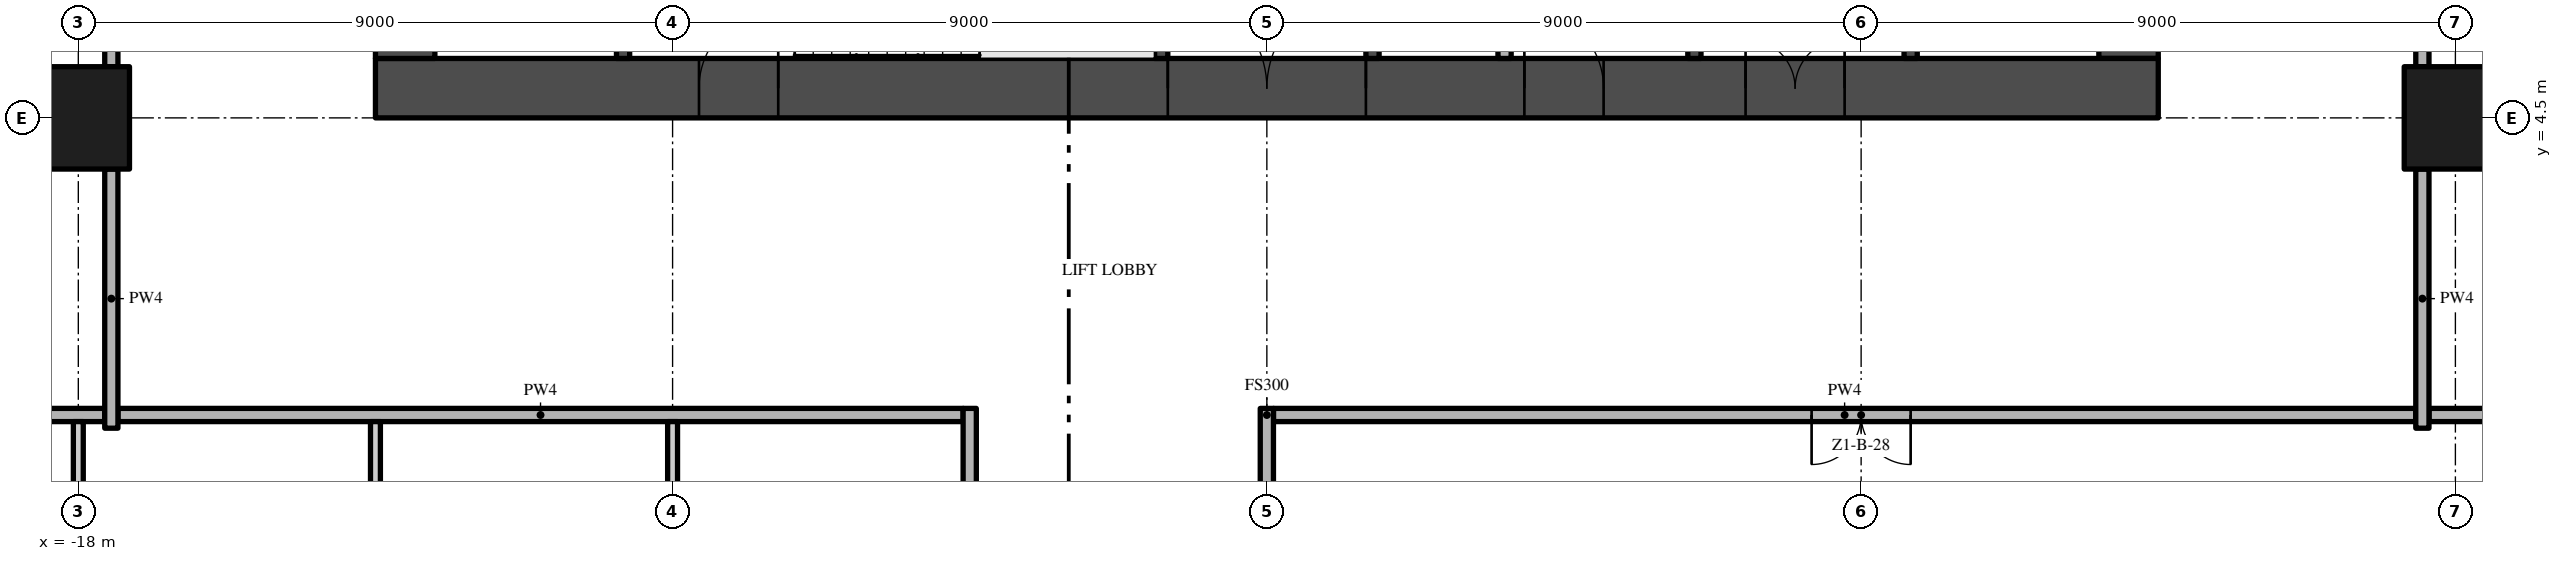
"""IFC4 building model, lengths in metres.
Left out: names, types, materials, properties, quantities, classifications, styles, units other than length and angle.
Written with IfcOpenShell. Run it as: python <this file> out.ifc"""

import sys

from ifc_helpers import new_model, si_unit, direction, frame, frame_2d, origin, origin_2d, place, context, subcontext, project, spatial, rectangle, extrude, element, fill, save


model = new_model("IFC4")
c1 = context("Model", 3, precision=1e-05, world=origin(), true_north=direction((0.0, 1.0)))
c2 = subcontext(c1, "Body", "Model", "MODEL_VIEW")
j1 = project(units=[si_unit("LENGTHUNIT", "METRE"), si_unit("PLANEANGLEUNIT", "RADIAN")], contexts=[c1])
p1 = place(None, origin())
s1 = spatial("IfcSite", under=j1, at=p1, CompositionType="ELEMENT")
p2 = place(p1, origin())
s2 = spatial("IfcBuilding", under=s1, at=p2, CompositionType="ELEMENT")
p3 = place(p2, frame((0.0, 0.0, 30.2)))
s3 = spatial("IfcBuildingStorey", under=s2, at=p3, CompositionType="ELEMENT", Elevation=30.2)
p4 = place(p3, frame((-13.5, 4.95, -0.3), z_axis=(0.0, 0.0, 1.0), x_axis=(1.0, 0.0, 0.0)))
e1 = element("IfcWall", 1, at=p4, inside=s3, PredefinedType="SHEAR", context=c2, shape_type="SweptSolid", body=[
    extrude(rectangle(XDim=27.0, YDim=0.9, at=frame_2d((13.5, 0.0))), origin(), (0.0, 0.0, 1.0), 3.8),
])
p5 = place(p4, frame((12.0, 0.0, 0.3)))
e2 = element("IfcOpeningElement", 2, at=p5, cuts=e1, PredefinedType="OPENING", context=c2, shape_type="SweptSolid", body=[
    extrude(rectangle(XDim=3.0, YDim=2.4, at=frame_2d((1.5, 1.2))), frame((0.0, 0.46, 0.0), z_axis=(0.0, -1.0, 0.0), x_axis=(1.0, 0.0, 0.0)), (0.0, 0.0, 1.0), 0.92),
])
p6 = place(p4, frame((4.9, 0.0, 0.3)))
e3 = element("IfcOpeningElement", 3, at=p6, cuts=e1, PredefinedType="OPENING", context=c2, shape_type="SweptSolid", body=[
    extrude(rectangle(XDim=1.2, YDim=2.2, at=frame_2d((0.6, 1.1))), frame((0.0, 0.46, 0.0), z_axis=(0.0, -1.0, 0.0), x_axis=(1.0, 0.0, 0.0)), (0.0, 0.0, 1.0), 0.92),
])
p7 = place(p4, frame((20.75, 0.0, 0.3)))
e4 = element("IfcOpeningElement", 4, at=p7, cuts=e1, PredefinedType="OPENING", context=c2, shape_type="SweptSolid", body=[
    extrude(rectangle(XDim=1.5, YDim=2.2, at=frame_2d((0.75, 1.1))), frame((0.0, 0.46, 0.0), z_axis=(0.0, -1.0, 0.0), x_axis=(1.0, 0.0, 0.0)), (0.0, 0.0, 1.0), 0.92),
])
p8 = place(p4, frame((17.4, 0.0, 0.3)))
e5 = element("IfcOpeningElement", 5, at=p8, cuts=e1, PredefinedType="OPENING", context=c2, shape_type="SweptSolid", body=[
    extrude(rectangle(XDim=1.2, YDim=2.2, at=frame_2d((0.6, 1.1))), frame((0.0, 0.46, 0.0), z_axis=(0.0, -1.0, 0.0), x_axis=(1.0, 0.0, 0.0)), (0.0, 0.0, 1.0), 0.92),
])
p9 = place(p3, frame((13.05, 5.4, -0.3), z_axis=(0.0, 0.0, 1.0), x_axis=(0.0, 1.0, 0.0)))
e6 = element("IfcWall", 6, at=p9, inside=s3, PredefinedType="SHEAR", context=c2, shape_type="SweptSolid", body=[
    extrude(rectangle(XDim=16.2, YDim=0.9, at=frame_2d((8.1, 0.0))), origin(), (0.0, 0.0, 1.0), 3.8),
])
p10 = place(p9, frame((6.0, 0.0, 0.3)))
e7 = element("IfcOpeningElement", 7, at=p10, cuts=e6, PredefinedType="OPENING", context=c2, shape_type="SweptSolid", body=[
    extrude(rectangle(XDim=1.2, YDim=2.2, at=frame_2d((0.6, 1.1))), frame((0.0, 0.46, 0.0), z_axis=(0.0, -1.0, 0.0), x_axis=(1.0, 0.0, 0.0)), (0.0, 0.0, 1.0), 0.92),
])
p11 = place(p3, frame((-13.05, 21.6, -0.3), z_axis=(0.0, 0.0, 1.0), x_axis=(0.0, -1.0, 0.0)))
e8 = element("IfcWall", 8, at=p11, inside=s3, PredefinedType="SHEAR", context=c2, shape_type="SweptSolid", body=[
    extrude(rectangle(XDim=16.2, YDim=0.9, at=frame_2d((8.1, 0.0))), origin(), (0.0, 0.0, 1.0), 3.8),
])
p12 = place(p11, frame((9.0, 0.0, 0.3)))
e9 = element("IfcOpeningElement", 9, at=p12, cuts=e8, PredefinedType="OPENING", context=c2, shape_type="SweptSolid", body=[
    extrude(rectangle(XDim=1.2, YDim=2.2, at=frame_2d((0.6, 1.1))), frame((0.0, 0.46, 0.0), z_axis=(0.0, -1.0, 0.0), x_axis=(1.0, 0.0, 0.0)), (0.0, 0.0, 1.0), 0.92),
])
for number, where, z_axis, x_axis in (
    (10, (-18.0, 4.5, 0.0), (0.0, 0.0, 1.0), (1.0, 0.0, 0.0)),
    (11, (18.0, 4.5, 0.0), (0.0, 0.0, 1.0), (1.0, 0.0, 0.0)),
):
    element("IfcColumn", number, at=place(p3, frame(where, z_axis=z_axis, x_axis=x_axis)), inside=s3, PredefinedType="COLUMN", context=c2, shape_type="SweptSolid", body=[
        extrude(rectangle(XDim=1.55, YDim=1.55, at=origin_2d()), origin(), (0.0, 0.0, 1.0), 3.5),
    ])
for number, where, z_axis, x_axis in (
    (12, (-9.75, 5.4, 0.0), (0.0, 0.0, 1.0), (0.0, 1.0, 0.0)),
    (13, (-1.6, 5.4, 0.0), (0.0, 0.0, 1.0), (0.0, 1.0, 0.0)),
):
    element("IfcWall", number, at=place(p3, frame(where, z_axis=z_axis, x_axis=x_axis)), inside=s3, PredefinedType="SHEAR", context=c2, shape_type="SweptSolid", body=[
        extrude(rectangle(XDim=2.55, YDim=0.2, at=frame_2d((1.275, 0.0))), origin(), (0.0, 0.0, 1.0), 3.5),
    ])
p13 = place(p3, frame((1.6, 13.5, 0.0), z_axis=(0.0, 0.0, 1.0), x_axis=(0.0, -1.0, 0.0)))
e14 = element("IfcWall", 14, at=p13, inside=s3, PredefinedType="SHEAR", context=c2, shape_type="SweptSolid", body=[
    extrude(rectangle(XDim=8.1, YDim=0.2, at=frame_2d((4.05, 0.0))), origin(), (0.0, 0.0, 1.0), 3.5),
])
p14 = place(p13, frame((3.2, 0.0, 0.0)))
e15 = element("IfcOpeningElement", 15, at=p14, cuts=e14, PredefinedType="OPENING", context=c2, shape_type="SweptSolid", body=[
    extrude(rectangle(XDim=0.9, YDim=2.1, at=frame_2d((0.45, 1.05))), frame((0.0, 0.11, 0.0), z_axis=(0.0, -1.0, 0.0), x_axis=(1.0, 0.0, 0.0)), (0.0, 0.0, 1.0), 0.22),
])
p15 = place(p3, frame((3.6, 13.5, 0.0), z_axis=(0.0, 0.0, 1.0), x_axis=(0.0, -1.0, 0.0)))
e16 = element("IfcWall", 16, at=p15, inside=s3, PredefinedType="PARTITIONING", context=c2, shape_type="SweptSolid", body=[
    extrude(rectangle(XDim=8.1, YDim=0.2, at=frame_2d((4.05, 0.0))), origin(), (0.0, 0.0, 1.0), 3.5),
])
p16 = place(p15, frame((3.6, 0.0, 0.0)))
e17 = element("IfcOpeningElement", 17, at=p16, cuts=e16, PredefinedType="OPENING", context=c2, shape_type="SweptSolid", body=[
    extrude(rectangle(XDim=0.9, YDim=2.1, at=frame_2d((0.45, 1.05))), frame((0.0, 0.11, 0.0), z_axis=(0.0, -1.0, 0.0), x_axis=(1.0, 0.0, 0.0)), (0.0, 0.0, 1.0), 0.22),
])
p17 = place(p3, frame((6.475, 5.4, 0.0), z_axis=(0.0, 0.0, 1.0), x_axis=(0.0, 1.0, 0.0)))
e18 = element("IfcWall", 18, at=p17, inside=s3, PredefinedType="SHEAR", context=c2, shape_type="SweptSolid", body=[
    extrude(rectangle(XDim=6.7, YDim=0.2, at=frame_2d((3.35, 0.0))), origin(), (0.0, 0.0, 1.0), 3.5),
])
p18 = place(p3, frame((9.75, 5.4, 0.0), z_axis=(0.0, 0.0, 1.0), x_axis=(0.0, 1.0, 0.0)))
e19 = element("IfcWall", 19, at=p18, inside=s3, PredefinedType="SHEAR", context=c2, shape_type="SweptSolid", body=[
    extrude(rectangle(XDim=2.2, YDim=0.2, at=frame_2d((1.1, 0.0))), origin(), (0.0, 0.0, 1.0), 3.5),
])
p19 = place(p18, frame((0.55, 0.0, 0.0)))
e20 = element("IfcOpeningElement", 20, at=p19, cuts=e19, PredefinedType="OPENING", context=c2, shape_type="SweptSolid", body=[
    extrude(rectangle(XDim=1.1, YDim=2.1, at=frame_2d((0.55, 1.05))), frame((0.0, 0.11, 0.0), z_axis=(0.0, -1.0, 0.0), x_axis=(1.0, 0.0, 0.0)), (0.0, 0.0, 1.0), 0.22),
])
p20 = place(p3, frame((-17.4, 0.0, 0.0), z_axis=(0.0, 0.0, 1.0), x_axis=(1.0, 0.0, 0.0)))
e21 = element("IfcWall", 21, at=p20, inside=s3, PredefinedType="PARTITIONING", context=c2, shape_type="SweptSolid", body=[
    extrude(rectangle(XDim=12.8, YDim=0.2, at=frame_2d((6.4, 0.0))), origin(), (0.0, 0.0, 1.0), 3.5),
])
p21 = place(p3, frame((17.4, 0.0, 0.0), z_axis=(0.0, 0.0, 1.0), x_axis=(-1.0, 0.0, 0.0)))
e22 = element("IfcWall", 22, at=p21, inside=s3, PredefinedType="PARTITIONING", context=c2, shape_type="SweptSolid", body=[
    extrude(rectangle(XDim=17.3, YDim=0.2, at=frame_2d((8.65, 0.0))), origin(), (0.0, 0.0, 1.0), 3.5),
])
p22 = place(p21, frame((7.65, 0.0, 0.0)))
e23 = element("IfcOpeningElement", 23, at=p22, cuts=e22, PredefinedType="OPENING", context=c2, shape_type="SweptSolid", body=[
    extrude(rectangle(XDim=1.5, YDim=2.4, at=frame_2d((0.75, 1.2))), frame((0.0, 0.11, 0.0), z_axis=(0.0, -1.0, 0.0), x_axis=(1.0, 0.0, 0.0)), (0.0, 0.0, 1.0), 0.22),
])
for number, where, z_axis, x_axis in (
    (24, (-26.7, 0.0, 0.0), (0.0, 0.0, 1.0), (1.0, 0.0, 0.0)),
    (25, (17.6, 0.0, 0.0), (0.0, 0.0, 1.0), (1.0, 0.0, 0.0)),
):
    element("IfcWall", number, at=place(p3, frame(where, z_axis=z_axis, x_axis=x_axis)), inside=s3, PredefinedType="PARTITIONING", context=c2, shape_type="SweptSolid", body=[
        extrude(rectangle(XDim=9.1, YDim=0.2, at=frame_2d((4.55, 0.0))), origin(), (0.0, 0.0, 1.0), 3.5),
    ])
p23 = place(p3, frame((-18.0, -3.725, 0.0), z_axis=(0.0, 0.0, 1.0), x_axis=(0.0, 1.0, 0.0)))
e26 = element("IfcWall", 26, at=p23, inside=s3, PredefinedType="PARTITIONING", context=c2, shape_type="SweptSolid", body=[
    extrude(rectangle(XDim=3.625, YDim=0.15, at=frame_2d((1.812, 0.0))), origin(), (0.0, 0.0, 1.0), 3.5),
])
p24 = place(p23, frame((0.75, 0.0, 0.0)))
e27 = element("IfcOpeningElement", 27, at=p24, cuts=e26, PredefinedType="OPENING", context=c2, shape_type="SweptSolid", body=[
    extrude(rectangle(XDim=1.5, YDim=2.4, at=frame_2d((0.75, 1.2))), frame((0.0, 0.085, 0.0), z_axis=(0.0, -1.0, 0.0), x_axis=(1.0, 0.0, 0.0)), (0.0, 0.0, 1.0), 0.17),
])
p25 = place(p3, frame((-17.5, -0.2, 0.0), z_axis=(0.0, 0.0, 1.0), x_axis=(0.0, 1.0, 0.0)))
e28 = element("IfcWall", 28, at=p25, inside=s3, PredefinedType="PARTITIONING", context=c2, shape_type="SweptSolid", body=[
    extrude(rectangle(XDim=3.925, YDim=0.2, at=frame_2d((1.962, 0.0))), origin(), (0.0, 0.0, 1.0), 3.5),
])
p26 = place(p3, frame((-17.5, 5.275, 0.0), z_axis=(0.0, 0.0, 1.0), x_axis=(0.0, 1.0, 0.0)))
e29 = element("IfcWall", 29, at=p26, inside=s3, PredefinedType="PARTITIONING", context=c2, shape_type="SweptSolid", body=[
    extrude(rectangle(XDim=7.45, YDim=0.2, at=frame_2d((3.725, 0.0))), origin(), (0.0, 0.0, 1.0), 3.5),
])
p27 = place(p26, frame((3.125, 0.0, 0.0)))
e30 = element("IfcOpeningElement", 30, at=p27, cuts=e29, PredefinedType="OPENING", context=c2, shape_type="SweptSolid", body=[
    extrude(rectangle(XDim=1.2, YDim=2.4, at=frame_2d((0.6, 1.2))), frame((0.0, 0.11, 0.0), z_axis=(0.0, -1.0, 0.0), x_axis=(1.0, 0.0, 0.0)), (0.0, 0.0, 1.0), 0.22),
])
p28 = place(p3, frame((-13.5, -0.1, 0.0), z_axis=(0.0, 0.0, 1.0), x_axis=(0.0, -1.0, 0.0)))
e31 = element("IfcWall", 31, at=p28, inside=s3, PredefinedType="PARTITIONING", context=c2, shape_type="SweptSolid", body=[
    extrude(rectangle(XDim=8.525, YDim=0.15, at=frame_2d((4.263, 0.0))), origin(), (0.0, 0.0, 1.0), 3.5),
])
p29 = place(p28, frame((4.0, 0.0, 0.0)))
e32 = element("IfcOpeningElement", 32, at=p29, cuts=e31, PredefinedType="OPENING", context=c2, shape_type="SweptSolid", body=[
    extrude(rectangle(XDim=0.8, YDim=2.0, at=frame_2d((0.4, 1.0))), frame((0.0, 0.085, 0.0), z_axis=(0.0, -1.0, 0.0), x_axis=(1.0, 0.0, 0.0)), (0.0, 0.0, 1.0), 0.17),
])
p30 = place(p3, frame((-9.0, -3.725, 0.0), z_axis=(0.0, 0.0, 1.0), x_axis=(0.0, 1.0, 0.0)))
e33 = element("IfcWall", 33, at=p30, inside=s3, PredefinedType="PARTITIONING", context=c2, shape_type="SweptSolid", body=[
    extrude(rectangle(XDim=3.625, YDim=0.15, at=frame_2d((1.812, 0.0))), origin(), (0.0, 0.0, 1.0), 3.5),
])
p31 = place(p30, frame((1.775, 0.0, 0.0)))
e34 = element("IfcOpeningElement", 34, at=p31, cuts=e33, PredefinedType="OPENING", context=c2, shape_type="SweptSolid", body=[
    extrude(rectangle(XDim=0.9, YDim=2.1, at=frame_2d((0.45, 1.05))), frame((0.0, 0.085, 0.0), z_axis=(0.0, -1.0, 0.0), x_axis=(1.0, 0.0, 0.0)), (0.0, 0.0, 1.0), 0.17),
])
p32 = place(p3, frame((-4.5, -22.2, 0.0), z_axis=(0.0, 0.0, 1.0), x_axis=(0.0, 1.0, 0.0)))
e35 = element("IfcWall", 35, at=p32, inside=s3, PredefinedType="PARTITIONING", context=c2, shape_type="SweptSolid", body=[
    extrude(rectangle(XDim=22.3, YDim=0.2, at=frame_2d((11.15, 0.0))), origin(), (0.0, 0.0, 1.0), 3.5),
])
p33 = place(p32, frame((10.2, 0.0, 0.0)))
e36 = element("IfcOpeningElement", 36, at=p33, cuts=e35, PredefinedType="OPENING", context=c2, shape_type="SweptSolid", body=[
    extrude(rectangle(XDim=1.5, YDim=2.4, at=frame_2d((0.75, 1.2))), frame((0.0, 0.11, 0.0), z_axis=(0.0, -1.0, 0.0), x_axis=(1.0, 0.0, 0.0)), (0.0, 0.0, 1.0), 0.22),
])
p34 = place(p3, frame((0.0, -3.725, 0.0), z_axis=(0.0, 0.0, 1.0), x_axis=(0.0, 1.0, 0.0)))
e37 = element("IfcWall", 37, at=p34, inside=s3, PredefinedType="PARTITIONING", context=c2, shape_type="SweptSolid", body=[
    extrude(rectangle(XDim=3.825, YDim=0.2, at=frame_2d((1.913, 0.0))), origin(), (0.0, 0.0, 1.0), 3.5),
])
p35 = place(p3, frame((17.5, -0.2, 0.0), z_axis=(0.0, 0.0, 1.0), x_axis=(0.0, 1.0, 0.0)))
e38 = element("IfcWall", 38, at=p35, inside=s3, PredefinedType="PARTITIONING", context=c2, shape_type="SweptSolid", body=[
    extrude(rectangle(XDim=3.925, YDim=0.2, at=frame_2d((1.962, 0.0))), origin(), (0.0, 0.0, 1.0), 3.5),
])
p36 = place(p3, frame((17.5, 5.275, 0.0), z_axis=(0.0, 0.0, 1.0), x_axis=(0.0, 1.0, 0.0)))
e39 = element("IfcWall", 39, at=p36, inside=s3, PredefinedType="PARTITIONING", context=c2, shape_type="SweptSolid", body=[
    extrude(rectangle(XDim=7.45, YDim=0.2, at=frame_2d((3.725, 0.0))), origin(), (0.0, 0.0, 1.0), 3.5),
])
p37 = place(p5, frame((3.0, 0.0, 0.0), z_axis=(0.0, 0.0, 1.0), x_axis=(-1.0, 0.0, 0.0)))
e40 = element("IfcDoor", 40, at=p37, inside=s3, OperationType="DOUBLE_DOOR_SINGLE_SWING", PredefinedType="DOOR", context=c2, shape_type="SweptSolid", body=[
    extrude(rectangle(XDim=3.0, YDim=2.4, at=frame_2d((1.5, 1.2))), frame((0.0, 0.025, 0.0), z_axis=(0.0, -1.0, 0.0), x_axis=(1.0, 0.0, 0.0)), (0.0, 0.0, 1.0), 0.05),
])
fill(e2, e40)
p38 = place(p6, frame((1.2, 0.0, 0.0), z_axis=(0.0, 0.0, 1.0), x_axis=(-1.0, 0.0, 0.0)))
e41 = element("IfcDoor", 41, at=p38, inside=s3, OperationType="SINGLE_SWING_LEFT", PredefinedType="DOOR", context=c2, shape_type="SweptSolid", body=[
    extrude(rectangle(XDim=1.2, YDim=2.2, at=frame_2d((0.6, 1.1))), frame((0.0, 0.025, 0.0), z_axis=(0.0, -1.0, 0.0), x_axis=(1.0, 0.0, 0.0)), (0.0, 0.0, 1.0), 0.05),
])
fill(e3, e41)
p39 = place(p7, frame((1.5, 0.0, 0.0), z_axis=(0.0, 0.0, 1.0), x_axis=(-1.0, 0.0, 0.0)))
e42 = element("IfcDoor", 42, at=p39, inside=s3, OperationType="DOUBLE_DOOR_SINGLE_SWING", PredefinedType="DOOR", context=c2, shape_type="SweptSolid", body=[
    extrude(rectangle(XDim=1.5, YDim=2.2, at=frame_2d((0.75, 1.1))), frame((0.0, 0.025, 0.0), z_axis=(0.0, -1.0, 0.0), x_axis=(1.0, 0.0, 0.0)), (0.0, 0.0, 1.0), 0.05),
])
fill(e4, e42)
p40 = place(p8, frame((1.2, 0.0, 0.0), z_axis=(0.0, 0.0, 1.0), x_axis=(-1.0, 0.0, 0.0)))
e43 = element("IfcDoor", 43, at=p40, inside=s3, OperationType="SINGLE_SWING_RIGHT", PredefinedType="DOOR", context=c2, shape_type="SweptSolid", body=[
    extrude(rectangle(XDim=1.2, YDim=2.2, at=frame_2d((0.6, 1.1))), frame((0.0, 0.025, 0.0), z_axis=(0.0, -1.0, 0.0), x_axis=(1.0, 0.0, 0.0)), (0.0, 0.0, 1.0), 0.05),
])
fill(e5, e43)
p41 = place(p22, origin())
e44 = element("IfcDoor", 44, at=p41, inside=s3, OperationType="DOUBLE_DOOR_SINGLE_SWING", PredefinedType="DOOR", context=c2, shape_type="SweptSolid", body=[
    extrude(rectangle(XDim=1.5, YDim=2.4, at=frame_2d((0.75, 1.2))), frame((0.0, 0.025, 0.0), z_axis=(0.0, -1.0, 0.0), x_axis=(1.0, 0.0, 0.0)), (0.0, 0.0, 1.0), 0.05),
])
fill(e23, e44)
save(model, sys.argv[1])
